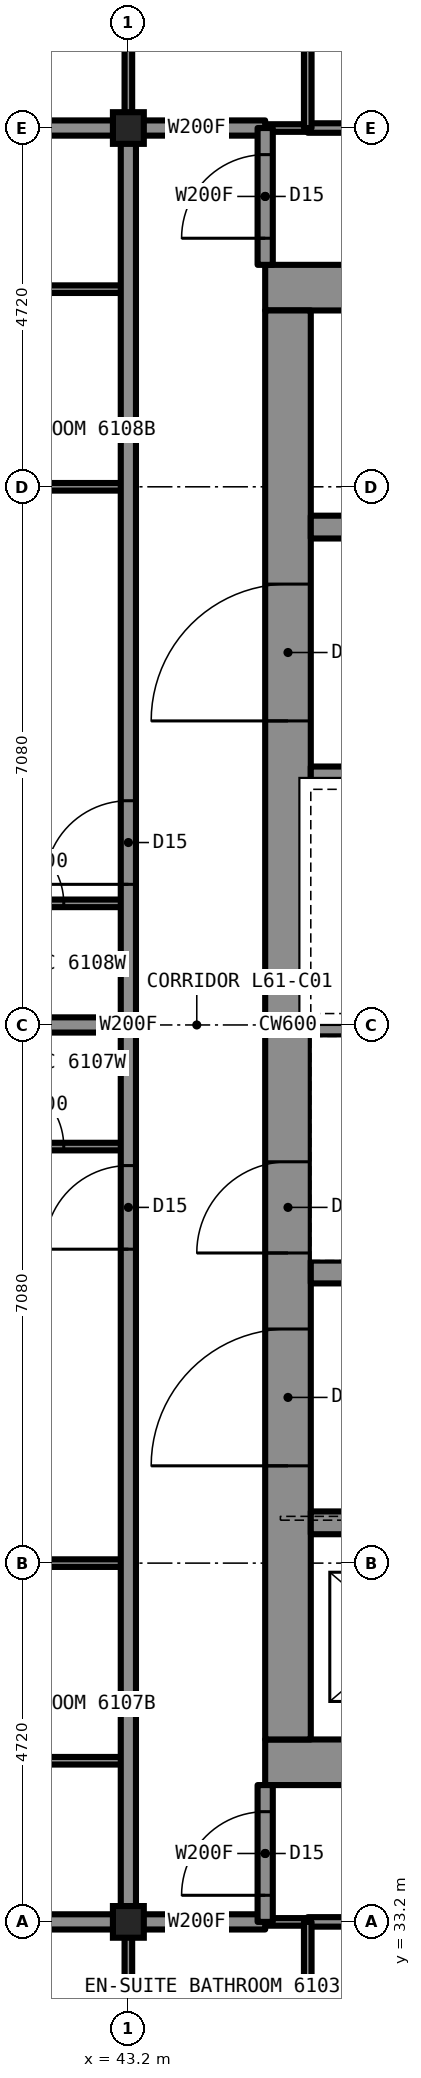
"""IFC4 building model, lengths in metres.
Left out: names, types, materials, properties, quantities, classifications, styles, units other than length and angle.
Written with IfcOpenShell. Run it as: python <this file> out.ifc"""

import sys

from ifc_helpers import new_model, si_unit, direction, frame, frame_2d, origin, origin_2d, place, context, subcontext, project, spatial, rectangle, i_section, extrude, element, fill, save


model = new_model("IFC4")
c1 = context("Model", 3, precision=1e-05, world=origin(), true_north=direction((0.0, 1.0)))
c2 = subcontext(c1, "Body", "Model", "MODEL_VIEW")
j1 = project(units=[si_unit("LENGTHUNIT", "METRE"), si_unit("PLANEANGLEUNIT", "RADIAN")], contexts=[c1])
p1 = place(None, origin())
s1 = spatial("IfcSite", under=j1, at=p1, CompositionType="ELEMENT")
p2 = place(p1, origin())
s2 = spatial("IfcBuilding", under=s1, at=p2, CompositionType="ELEMENT")
p3 = place(p2, frame((0.0, 0.0, 226.7)))
s3 = spatial("IfcBuildingStorey", under=s2, at=p3, CompositionType="ELEMENT", Elevation=226.7)
for number, where, z_axis, x_axis in (
    (1, (43.2, 33.2, 0.0), (0.0, 0.0, 1.0), (1.0, 0.0, 0.0)),
    (2, (43.2, 56.8, 0.0), (0.0, 0.0, 1.0), (1.0, 0.0, 0.0)),
):
    element("IfcColumn", number, at=place(p3, frame(where, z_axis=z_axis, x_axis=x_axis)), inside=s3, PredefinedType="COLUMN", context=c2, shape_type="SweptSolid", body=[
        extrude(i_section(OverallWidth=0.406, OverallDepth=0.417, WebThickness=0.03, FlangeThickness=0.048, at=origin_2d()), origin(), (0.0, 0.0, 1.0), 3.5),
    ])
for number, where, z_axis, x_axis in (
    (3, (45.0, 54.7, 0.0), (0.0, 0.0, 1.0), (1.0, 0.0, 0.0)),
    (4, (45.0, 35.3, 0.0), (0.0, 0.0, 1.0), (1.0, 0.0, 0.0)),
):
    element("IfcWall", number, at=place(p3, frame(where, z_axis=z_axis, x_axis=x_axis)), inside=s3, PredefinedType="SHEAR", context=c2, shape_type="SweptSolid", body=[
        extrude(rectangle(XDim=20.0, YDim=0.6, at=frame_2d((10.0, 0.0))), origin(), (0.0, 0.0, 1.0), 3.5),
    ])
p4 = place(p3, frame((45.3, 35.6, 0.0), z_axis=(0.0, 0.0, 1.0), x_axis=(0.0, 1.0, 0.0)))
e5 = element("IfcWall", 5, at=p4, inside=s3, PredefinedType="SHEAR", context=c2, shape_type="SweptSolid", body=[
    extrude(rectangle(XDim=18.8, YDim=0.6, at=frame_2d((9.4, 0.0))), origin(), (0.0, 0.0, 1.0), 3.5),
])
p5 = place(p4, frame((13.4, 0.0, 0.0)))
e6 = element("IfcOpeningElement", 6, at=p5, cuts=e5, PredefinedType="OPENING", context=c2, shape_type="SweptSolid", body=[
    extrude(rectangle(XDim=1.8, YDim=2.2, at=frame_2d((0.9, 1.1))), frame((0.0, 0.31, 0.0), z_axis=(0.0, -1.0, 0.0), x_axis=(1.0, 0.0, 0.0)), (0.0, 0.0, 1.0), 0.62),
])
p6 = place(p4, frame((3.6, 0.0, 0.0)))
e7 = element("IfcOpeningElement", 7, at=p6, cuts=e5, PredefinedType="OPENING", context=c2, shape_type="SweptSolid", body=[
    extrude(rectangle(XDim=1.8, YDim=2.2, at=frame_2d((0.9, 1.1))), frame((0.0, 0.31, 0.0), z_axis=(0.0, -1.0, 0.0), x_axis=(1.0, 0.0, 0.0)), (0.0, 0.0, 1.0), 0.62),
])
p7 = place(p4, frame((6.4, 0.0, 0.0)))
e8 = element("IfcOpeningElement", 8, at=p7, cuts=e5, PredefinedType="OPENING", context=c2, shape_type="SweptSolid", body=[
    extrude(rectangle(XDim=1.2, YDim=2.2, at=frame_2d((0.6, 1.1))), frame((0.0, 0.31, 0.0), z_axis=(0.0, -1.0, 0.0), x_axis=(1.0, 0.0, 0.0)), (0.0, 0.0, 1.0), 0.62),
])
p8 = place(p3, frame((45.6, 51.55, 0.0), z_axis=(0.0, 0.0, 1.0), x_axis=(1.0, 0.0, 0.0)))
e9 = element("IfcWall", 9, at=p8, inside=s3, PredefinedType="SHEAR", context=c2, shape_type="SweptSolid", body=[
    extrude(rectangle(XDim=18.8, YDim=0.3, at=frame_2d((9.4, 0.0))), origin(), (0.0, 0.0, 1.0), 3.5),
])
p9 = place(p8, frame((4.8, 0.0, 0.0)))
e10 = element("IfcOpeningElement", 10, at=p9, cuts=e9, PredefinedType="OPENING", context=c2, shape_type="SweptSolid", body=[
    extrude(rectangle(XDim=1.0, YDim=2.1, at=frame_2d((0.5, 1.05))), frame((0.0, 0.16, 0.0), z_axis=(0.0, -1.0, 0.0), x_axis=(1.0, 0.0, 0.0)), (0.0, 0.0, 1.0), 0.32),
])
p10 = place(p8, frame((11.6, 0.0, 0.0)))
e11 = element("IfcOpeningElement", 11, at=p10, cuts=e9, PredefinedType="OPENING", context=c2, shape_type="SweptSolid", body=[
    extrude(rectangle(XDim=1.1, YDim=2.2, at=frame_2d((0.55, 1.1))), frame((0.0, 0.16, 0.0), z_axis=(0.0, -1.0, 0.0), x_axis=(1.0, 0.0, 0.0)), (0.0, 0.0, 1.0), 0.32),
])
p11 = place(p8, frame((14.3, 0.0, 0.0)))
e12 = element("IfcOpeningElement", 12, at=p11, cuts=e9, PredefinedType="OPENING", context=c2, shape_type="SweptSolid", body=[
    extrude(rectangle(XDim=1.1, YDim=2.2, at=frame_2d((0.55, 1.1))), frame((0.0, 0.16, 0.0), z_axis=(0.0, -1.0, 0.0), x_axis=(1.0, 0.0, 0.0)), (0.0, 0.0, 1.0), 0.32),
])
p12 = place(p3, frame((45.6, 38.45, 0.0), z_axis=(0.0, 0.0, 1.0), x_axis=(1.0, 0.0, 0.0)))
e13 = element("IfcWall", 13, at=p12, inside=s3, PredefinedType="SHEAR", context=c2, shape_type="SweptSolid", body=[
    extrude(rectangle(XDim=18.8, YDim=0.3, at=frame_2d((9.4, 0.0))), origin(), (0.0, 0.0, 1.0), 3.5),
])
p13 = place(p12, frame((0.7, 0.0, 0.0)))
e14 = element("IfcOpeningElement", 14, at=p13, cuts=e13, PredefinedType="OPENING", context=c2, shape_type="SweptSolid", body=[
    extrude(rectangle(XDim=1.1, YDim=2.2, at=frame_2d((0.55, 1.1))), frame((0.0, 0.16, 0.0), z_axis=(0.0, -1.0, 0.0), x_axis=(1.0, 0.0, 0.0)), (0.0, 0.0, 1.0), 0.32),
])
p14 = place(p12, frame((3.4, 0.0, 0.0)))
e15 = element("IfcOpeningElement", 15, at=p14, cuts=e13, PredefinedType="OPENING", context=c2, shape_type="SweptSolid", body=[
    extrude(rectangle(XDim=1.1, YDim=2.2, at=frame_2d((0.55, 1.1))), frame((0.0, 0.16, 0.0), z_axis=(0.0, -1.0, 0.0), x_axis=(1.0, 0.0, 0.0)), (0.0, 0.0, 1.0), 0.32),
])
p15 = place(p12, frame((6.1, 0.0, 0.0)))
e16 = element("IfcOpeningElement", 16, at=p15, cuts=e13, PredefinedType="OPENING", context=c2, shape_type="SweptSolid", body=[
    extrude(rectangle(XDim=1.1, YDim=2.2, at=frame_2d((0.55, 1.1))), frame((0.0, 0.16, 0.0), z_axis=(0.0, -1.0, 0.0), x_axis=(1.0, 0.0, 0.0)), (0.0, 0.0, 1.0), 0.32),
])
p16 = place(p12, frame((8.8, 0.0, 0.0)))
e17 = element("IfcOpeningElement", 17, at=p16, cuts=e13, PredefinedType="OPENING", context=c2, shape_type="SweptSolid", body=[
    extrude(rectangle(XDim=1.1, YDim=2.2, at=frame_2d((0.55, 1.1))), frame((0.0, 0.16, 0.0), z_axis=(0.0, -1.0, 0.0), x_axis=(1.0, 0.0, 0.0)), (0.0, 0.0, 1.0), 0.32),
])
for number, where, z_axis, x_axis in (
    (18, (45.6, 48.25, 0.0), (0.0, 0.0, 1.0), (1.0, 0.0, 0.0)),
    (19, (45.6, 41.75, 0.0), (0.0, 0.0, 1.0), (1.0, 0.0, 0.0)),
):
    element("IfcWall", number, at=place(p3, frame(where, z_axis=z_axis, x_axis=x_axis)), inside=s3, PredefinedType="SHEAR", context=c2, shape_type="SweptSolid", body=[
        extrude(rectangle(XDim=7.1, YDim=0.3, at=frame_2d((3.55, 0.0))), origin(), (0.0, 0.0, 1.0), 3.5),
    ])
p17 = place(p3, frame((45.6, 45.0, 0.0), z_axis=(0.0, 0.0, 1.0), x_axis=(1.0, 0.0, 0.0)))
e20 = element("IfcWall", 20, at=p17, inside=s3, PredefinedType="SHEAR", context=c2, shape_type="SweptSolid", body=[
    extrude(rectangle(XDim=6.8, YDim=0.3, at=frame_2d((3.4, 0.0))), origin(), (0.0, 0.0, 1.0), 3.5),
])
p18 = place(p3, frame((41.0, 43.4, 0.0), z_axis=(0.0, 0.0, 1.0), x_axis=(1.0, 0.0, 0.0)))
e21 = element("IfcWall", 21, at=p18, inside=s3, PredefinedType="PARTITIONING", context=c2, shape_type="SweptSolid", body=[
    extrude(rectangle(XDim=2.2, YDim=0.1, at=frame_2d((1.1, 0.0))), origin(), (0.0, 0.0, 1.0), 3.33),
])
p19 = place(p18, frame((0.45, 0.0, 0.0)))
e22 = element("IfcOpeningElement", 22, at=p19, cuts=e21, PredefinedType="OPENING", context=c2, shape_type="SweptSolid", body=[
    extrude(rectangle(XDim=0.9, YDim=2.1, at=frame_2d((0.45, 1.05))), frame((0.0, 0.06, 0.0), z_axis=(0.0, -1.0, 0.0), x_axis=(1.0, 0.0, 0.0)), (0.0, 0.0, 1.0), 0.12),
])
p20 = place(p3, frame((45.0, 33.2, 0.0), z_axis=(0.0, 0.0, 1.0), x_axis=(1.0, 0.0, 0.0)))
e23 = element("IfcWall", 23, at=p20, inside=s3, PredefinedType="PARTITIONING", context=c2, shape_type="SweptSolid", body=[
    extrude(rectangle(XDim=0.56, YDim=0.1, at=frame_2d((0.28, 0.0))), origin(), (0.0, 0.0, 1.0), 3.33),
])
p21 = place(p3, frame((43.2, 33.2, 0.0), z_axis=(0.0, 0.0, 1.0), x_axis=(1.0, 0.0, 0.0)))
e24 = element("IfcWall", 24, at=p21, inside=s3, PredefinedType="PARTITIONING", context=c2, shape_type="SweptSolid", body=[
    extrude(rectangle(XDim=1.8, YDim=0.2, at=frame_2d((0.9, 0.0))), origin(), (0.0, 0.0, 1.0), 3.33),
])
p22 = place(p3, frame((37.3, 33.2, 0.0), z_axis=(0.0, 0.0, 1.0), x_axis=(1.0, 0.0, 0.0)))
e25 = element("IfcWall", 25, at=p22, inside=s3, PredefinedType="PARTITIONING", context=c2, shape_type="SweptSolid", body=[
    extrude(rectangle(XDim=5.9, YDim=0.2, at=frame_2d((2.95, 0.0))), origin(), (0.0, 0.0, 1.0), 2.573),
])
p23 = place(p3, frame((45.56, 33.2, 0.0), z_axis=(0.0, 0.0, 1.0), x_axis=(1.0, 0.0, 0.0)))
e26 = element("IfcWall", 26, at=p23, inside=s3, PredefinedType="PARTITIONING", context=c2, shape_type="SweptSolid", body=[
    extrude(rectangle(XDim=7.84, YDim=0.125, at=frame_2d((3.92, 0.0))), origin(), (0.0, 0.0, 1.0), 3.33),
])
p24 = place(p23, frame((3.49, 0.0, 0.0)))
e27 = element("IfcOpeningElement", 27, at=p24, cuts=e26, PredefinedType="OPENING", context=c2, shape_type="SweptSolid", body=[
    extrude(rectangle(XDim=0.9, YDim=2.2, at=frame_2d((0.45, 1.1))), frame((0.0, 0.073, 0.0), z_axis=(0.0, -1.0, 0.0), x_axis=(1.0, 0.0, 0.0)), (0.0, 0.0, 1.0), 0.145),
])
p25 = place(p3, frame((40.4, 37.92, 0.0), z_axis=(0.0, 0.0, 1.0), x_axis=(1.0, 0.0, 0.0)))
e28 = element("IfcWall", 28, at=p25, inside=s3, PredefinedType="PARTITIONING", context=c2, shape_type="SweptSolid", body=[
    extrude(rectangle(XDim=2.8, YDim=0.1, at=frame_2d((1.4, 0.0))), origin(), (0.0, 0.0, 1.0), 2.573),
])
p26 = place(p3, frame((40.4, 35.32, 0.0), z_axis=(0.0, 0.0, 1.0), x_axis=(1.0, 0.0, 0.0)))
e29 = element("IfcWall", 29, at=p26, inside=s3, PredefinedType="PARTITIONING", context=c2, shape_type="SweptSolid", body=[
    extrude(rectangle(XDim=2.8, YDim=0.1, at=frame_2d((1.4, 0.0))), origin(), (0.0, 0.0, 1.0), 3.33),
])
p27 = place(p3, frame((37.3, 45.0, 0.0), z_axis=(0.0, 0.0, 1.0), x_axis=(1.0, 0.0, 0.0)))
e30 = element("IfcWall", 30, at=p27, inside=s3, PredefinedType="PARTITIONING", context=c2, shape_type="SweptSolid", body=[
    extrude(rectangle(XDim=5.9, YDim=0.2, at=frame_2d((2.95, 0.0))), origin(), (0.0, 0.0, 1.0), 2.797),
])
p28 = place(p3, frame((41.0, 46.6, 0.0), z_axis=(0.0, 0.0, 1.0), x_axis=(1.0, 0.0, 0.0)))
e31 = element("IfcWall", 31, at=p28, inside=s3, PredefinedType="PARTITIONING", context=c2, shape_type="SweptSolid", body=[
    extrude(rectangle(XDim=2.2, YDim=0.1, at=frame_2d((1.1, 0.0))), origin(), (0.0, 0.0, 1.0), 3.33),
])
p29 = place(p28, frame((0.45, 0.0, 0.0)))
e32 = element("IfcOpeningElement", 32, at=p29, cuts=e31, PredefinedType="OPENING", context=c2, shape_type="SweptSolid", body=[
    extrude(rectangle(XDim=0.9, YDim=2.1, at=frame_2d((0.45, 1.05))), frame((0.0, 0.06, 0.0), z_axis=(0.0, -1.0, 0.0), x_axis=(1.0, 0.0, 0.0)), (0.0, 0.0, 1.0), 0.12),
])
p30 = place(p3, frame((45.0, 56.8, 0.0), z_axis=(0.0, 0.0, 1.0), x_axis=(1.0, 0.0, 0.0)))
e33 = element("IfcWall", 33, at=p30, inside=s3, PredefinedType="PARTITIONING", context=c2, shape_type="SweptSolid", body=[
    extrude(rectangle(XDim=0.56, YDim=0.1, at=frame_2d((0.28, 0.0))), origin(), (0.0, 0.0, 1.0), 3.33),
])
p31 = place(p3, frame((43.2, 56.8, 0.0), z_axis=(0.0, 0.0, 1.0), x_axis=(1.0, 0.0, 0.0)))
e34 = element("IfcWall", 34, at=p31, inside=s3, PredefinedType="PARTITIONING", context=c2, shape_type="SweptSolid", body=[
    extrude(rectangle(XDim=1.8, YDim=0.2, at=frame_2d((0.9, 0.0))), origin(), (0.0, 0.0, 1.0), 3.33),
])
p32 = place(p3, frame((37.3, 56.8, 0.0), z_axis=(0.0, 0.0, 1.0), x_axis=(1.0, 0.0, 0.0)))
e35 = element("IfcWall", 35, at=p32, inside=s3, PredefinedType="PARTITIONING", context=c2, shape_type="SweptSolid", body=[
    extrude(rectangle(XDim=5.9, YDim=0.2, at=frame_2d((2.95, 0.0))), origin(), (0.0, 0.0, 1.0), 2.573),
])
p33 = place(p3, frame((45.56, 56.8, 0.0), z_axis=(0.0, 0.0, 1.0), x_axis=(1.0, 0.0, 0.0)))
e36 = element("IfcWall", 36, at=p33, inside=s3, PredefinedType="PARTITIONING", context=c2, shape_type="SweptSolid", body=[
    extrude(rectangle(XDim=7.84, YDim=0.125, at=frame_2d((3.92, 0.0))), origin(), (0.0, 0.0, 1.0), 3.33),
])
p34 = place(p33, frame((3.49, 0.0, 0.0)))
e37 = element("IfcOpeningElement", 37, at=p34, cuts=e36, PredefinedType="OPENING", context=c2, shape_type="SweptSolid", body=[
    extrude(rectangle(XDim=0.9, YDim=2.2, at=frame_2d((0.45, 1.1))), frame((0.0, 0.073, 0.0), z_axis=(0.0, -1.0, 0.0), x_axis=(1.0, 0.0, 0.0)), (0.0, 0.0, 1.0), 0.145),
])
p35 = place(p3, frame((40.4, 52.08, 0.0), z_axis=(0.0, 0.0, 1.0), x_axis=(1.0, 0.0, 0.0)))
e38 = element("IfcWall", 38, at=p35, inside=s3, PredefinedType="PARTITIONING", context=c2, shape_type="SweptSolid", body=[
    extrude(rectangle(XDim=2.8, YDim=0.1, at=frame_2d((1.4, 0.0))), origin(), (0.0, 0.0, 1.0), 2.573),
])
p36 = place(p3, frame((40.4, 54.68, 0.0), z_axis=(0.0, 0.0, 1.0), x_axis=(1.0, 0.0, 0.0)))
e39 = element("IfcWall", 39, at=p36, inside=s3, PredefinedType="PARTITIONING", context=c2, shape_type="SweptSolid", body=[
    extrude(rectangle(XDim=2.8, YDim=0.1, at=frame_2d((1.4, 0.0))), origin(), (0.0, 0.0, 1.0), 3.33),
])
p37 = place(p3, frame((45.0, 33.2, 0.0), z_axis=(0.0, 0.0, 1.0), x_axis=(0.0, 1.0, 0.0)))
e40 = element("IfcWall", 40, at=p37, inside=s3, PredefinedType="PARTITIONING", context=c2, shape_type="SweptSolid", body=[
    extrude(rectangle(XDim=1.8, YDim=0.2, at=frame_2d((0.9, 0.0))), origin(), (0.0, 0.0, 1.0), 3.33),
])
p38 = place(p37, frame((0.35, 0.0, 0.0)))
e41 = element("IfcOpeningElement", 41, at=p38, cuts=e40, PredefinedType="OPENING", context=c2, shape_type="SweptSolid", body=[
    extrude(rectangle(XDim=1.1, YDim=2.2, at=frame_2d((0.55, 1.1))), frame((0.0, 0.11, 0.0), z_axis=(0.0, -1.0, 0.0), x_axis=(1.0, 0.0, 0.0)), (0.0, 0.0, 1.0), 0.22),
])
p39 = place(p3, frame((45.0, 55.0, 0.0), z_axis=(0.0, 0.0, 1.0), x_axis=(0.0, 1.0, 0.0)))
e42 = element("IfcWall", 42, at=p39, inside=s3, PredefinedType="PARTITIONING", context=c2, shape_type="SweptSolid", body=[
    extrude(rectangle(XDim=1.8, YDim=0.2, at=frame_2d((0.9, 0.0))), origin(), (0.0, 0.0, 1.0), 3.33),
])
p40 = place(p39, frame((0.35, 0.0, 0.0)))
e43 = element("IfcOpeningElement", 43, at=p40, cuts=e42, PredefinedType="OPENING", context=c2, shape_type="SweptSolid", body=[
    extrude(rectangle(XDim=1.1, YDim=2.2, at=frame_2d((0.55, 1.1))), frame((0.0, 0.11, 0.0), z_axis=(0.0, -1.0, 0.0), x_axis=(1.0, 0.0, 0.0)), (0.0, 0.0, 1.0), 0.22),
])
for number, where, z_axis, x_axis in (
    (44, (43.2, 30.4, 0.0), (0.0, 0.0, 1.0), (0.0, 1.0, 0.0)),
    (45, (43.2, 56.8, 0.0), (0.0, 0.0, 1.0), (0.0, 1.0, 0.0)),
):
    element("IfcWall", number, at=place(p3, frame(where, z_axis=z_axis, x_axis=x_axis)), inside=s3, PredefinedType="PARTITIONING", context=c2, shape_type="SweptSolid", body=[
        extrude(rectangle(XDim=2.8, YDim=0.1, at=frame_2d((1.4, 0.0))), origin(), (0.0, 0.0, 1.0), 2.573),
    ])
p41 = place(p3, frame((43.2, 33.2, 0.0), z_axis=(0.0, 0.0, 1.0), x_axis=(0.0, 1.0, 0.0)))
e46 = element("IfcWall", 46, at=p41, inside=s3, PredefinedType="PARTITIONING", context=c2, shape_type="SweptSolid", body=[
    extrude(rectangle(XDim=23.6, YDim=0.2, at=frame_2d((11.8, 0.0))), origin(), (0.0, 0.0, 1.0), 3.33),
])
p42 = place(p41, frame((8.85, 0.0, 0.0)))
e47 = element("IfcOpeningElement", 47, at=p42, cuts=e46, PredefinedType="OPENING", context=c2, shape_type="SweptSolid", body=[
    extrude(rectangle(XDim=1.1, YDim=2.2, at=frame_2d((0.55, 1.1))), frame((0.0, 0.11, 0.0), z_axis=(0.0, -1.0, 0.0), x_axis=(1.0, 0.0, 0.0)), (0.0, 0.0, 1.0), 0.22),
])
p43 = place(p41, frame((13.65, 0.0, 0.0)))
e48 = element("IfcOpeningElement", 48, at=p43, cuts=e46, PredefinedType="OPENING", context=c2, shape_type="SweptSolid", body=[
    extrude(rectangle(XDim=1.1, YDim=2.2, at=frame_2d((0.55, 1.1))), frame((0.0, 0.11, 0.0), z_axis=(0.0, -1.0, 0.0), x_axis=(1.0, 0.0, 0.0)), (0.0, 0.0, 1.0), 0.22),
])
for number, where, z_axis, x_axis in (
    (49, (45.56, 30.4, 0.0), (0.0, 0.0, 1.0), (0.0, 1.0, 0.0)),
    (50, (45.56, 56.8, 0.0), (0.0, 0.0, 1.0), (0.0, 1.0, 0.0)),
):
    element("IfcWall", number, at=place(p3, frame(where, z_axis=z_axis, x_axis=x_axis)), inside=s3, PredefinedType="PARTITIONING", context=c2, shape_type="SweptSolid", body=[
        extrude(rectangle(XDim=2.8, YDim=0.1, at=frame_2d((1.4, 0.0))), origin(), (0.0, 0.0, 1.0), 3.33),
    ])
p44 = place(p40, origin())
e51 = element("IfcDoor", 51, at=p44, inside=s3, OperationType="SINGLE_SWING_LEFT", PredefinedType="DOOR", context=c2, shape_type="SweptSolid", body=[
    extrude(rectangle(XDim=1.1, YDim=2.2, at=frame_2d((0.55, 1.1))), frame((0.0, 0.025, 0.0), z_axis=(0.0, -1.0, 0.0), x_axis=(1.0, 0.0, 0.0)), (0.0, 0.0, 1.0), 0.05),
])
fill(e43, e51)
p45 = place(p38, origin())
e52 = element("IfcDoor", 52, at=p45, inside=s3, OperationType="SINGLE_SWING_LEFT", PredefinedType="DOOR", context=c2, shape_type="SweptSolid", body=[
    extrude(rectangle(XDim=1.1, YDim=2.2, at=frame_2d((0.55, 1.1))), frame((0.0, 0.025, 0.0), z_axis=(0.0, -1.0, 0.0), x_axis=(1.0, 0.0, 0.0)), (0.0, 0.0, 1.0), 0.05),
])
fill(e41, e52)
p46 = place(p42, origin())
e53 = element("IfcDoor", 53, at=p46, inside=s3, OperationType="SINGLE_SWING_LEFT", PredefinedType="DOOR", context=c2, shape_type="SweptSolid", body=[
    extrude(rectangle(XDim=1.1, YDim=2.2, at=frame_2d((0.55, 1.1))), frame((0.0, 0.025, 0.0), z_axis=(0.0, -1.0, 0.0), x_axis=(1.0, 0.0, 0.0)), (0.0, 0.0, 1.0), 0.05),
])
fill(e47, e53)
p47 = place(p19, origin())
e54 = element("IfcDoor", 54, at=p47, inside=s3, OperationType="SINGLE_SWING_LEFT", PredefinedType="DOOR", context=c2, shape_type="SweptSolid", body=[
    extrude(rectangle(XDim=0.9, YDim=2.1, at=frame_2d((0.45, 1.05))), frame((0.0, 0.025, 0.0), z_axis=(0.0, -1.0, 0.0), x_axis=(1.0, 0.0, 0.0)), (0.0, 0.0, 1.0), 0.05),
])
fill(e22, e54)
p48 = place(p43, origin())
e55 = element("IfcDoor", 55, at=p48, inside=s3, OperationType="SINGLE_SWING_LEFT", PredefinedType="DOOR", context=c2, shape_type="SweptSolid", body=[
    extrude(rectangle(XDim=1.1, YDim=2.2, at=frame_2d((0.55, 1.1))), frame((0.0, 0.025, 0.0), z_axis=(0.0, -1.0, 0.0), x_axis=(1.0, 0.0, 0.0)), (0.0, 0.0, 1.0), 0.05),
])
fill(e48, e55)
p49 = place(p29, origin())
e56 = element("IfcDoor", 56, at=p49, inside=s3, OperationType="SINGLE_SWING_LEFT", PredefinedType="DOOR", context=c2, shape_type="SweptSolid", body=[
    extrude(rectangle(XDim=0.9, YDim=2.1, at=frame_2d((0.45, 1.05))), frame((0.0, 0.025, 0.0), z_axis=(0.0, -1.0, 0.0), x_axis=(1.0, 0.0, 0.0)), (0.0, 0.0, 1.0), 0.05),
])
fill(e32, e56)
p50 = place(p5, origin())
e57 = element("IfcDoor", 57, at=p50, inside=s3, OperationType="DOUBLE_DOOR_SINGLE_SWING", PredefinedType="DOOR", context=c2, shape_type="SweptSolid", body=[
    extrude(rectangle(XDim=1.8, YDim=2.2, at=frame_2d((0.9, 1.1))), frame((0.0, 0.025, 0.0), z_axis=(0.0, -1.0, 0.0), x_axis=(1.0, 0.0, 0.0)), (0.0, 0.0, 1.0), 0.05),
])
fill(e6, e57)
p51 = place(p6, origin())
e58 = element("IfcDoor", 58, at=p51, inside=s3, OperationType="DOUBLE_DOOR_SINGLE_SWING", PredefinedType="DOOR", context=c2, shape_type="SweptSolid", body=[
    extrude(rectangle(XDim=1.8, YDim=2.2, at=frame_2d((0.9, 1.1))), frame((0.0, 0.025, 0.0), z_axis=(0.0, -1.0, 0.0), x_axis=(1.0, 0.0, 0.0)), (0.0, 0.0, 1.0), 0.05),
])
fill(e7, e58)
p52 = place(p7, origin())
e59 = element("IfcDoor", 59, at=p52, inside=s3, OperationType="SINGLE_SWING_LEFT", PredefinedType="DOOR", context=c2, shape_type="SweptSolid", body=[
    extrude(rectangle(XDim=1.2, YDim=2.2, at=frame_2d((0.6, 1.1))), frame((0.0, 0.025, 0.0), z_axis=(0.0, -1.0, 0.0), x_axis=(1.0, 0.0, 0.0)), (0.0, 0.0, 1.0), 0.05),
])
fill(e8, e59)
save(model, sys.argv[1])
